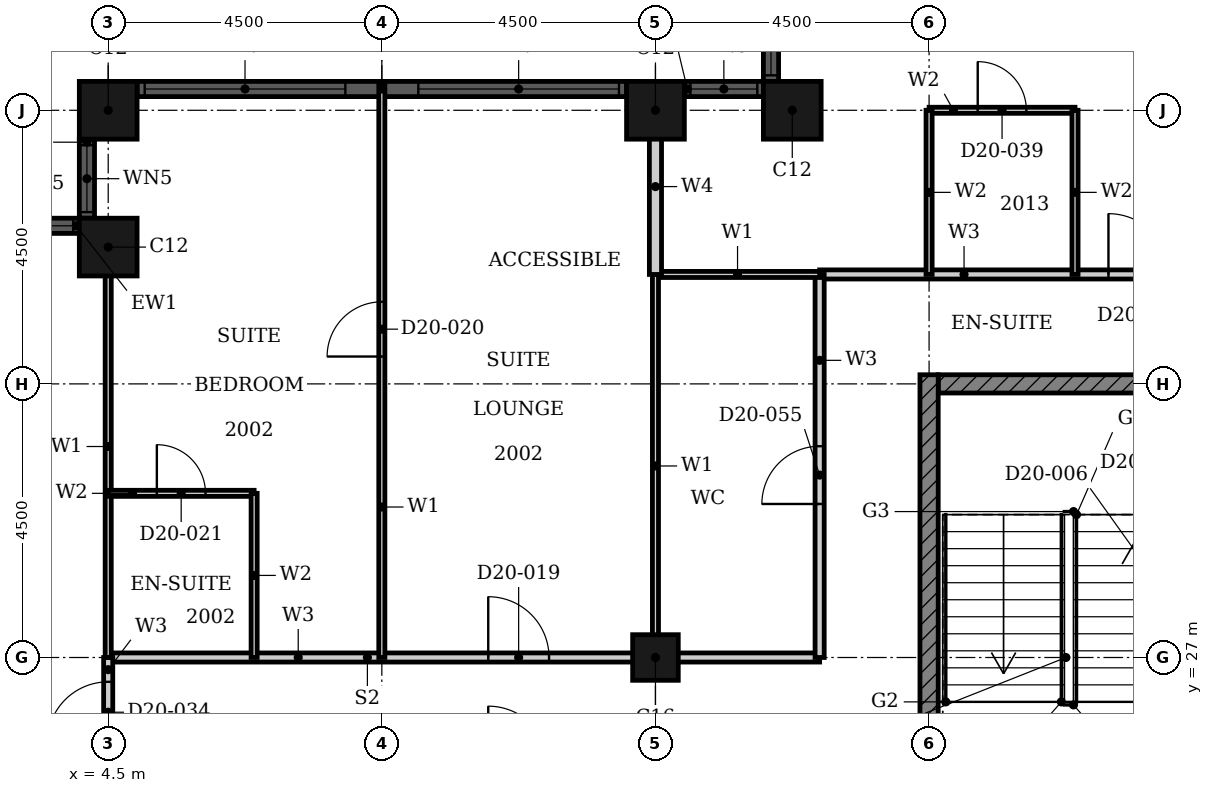
"""IFC4 building model, lengths in metres.
Left out: names, types, materials, properties, quantities, classifications, styles, units other than length and angle.
Written with IfcOpenShell. Run it as: python <this file> out.ifc"""

import sys

from ifc_helpers import new_model, si_unit, direction, frame, frame_2d, origin, origin_2d, place, context, subcontext, project, spatial, rectangle, hollow_rectangle, extrude, element, fill, save


model = new_model("IFC4")
c1 = context("Model", 3, precision=1e-05, world=origin(), true_north=direction((0.0, 1.0)))
c2 = subcontext(c1, "Body", "Model", "MODEL_VIEW")
j1 = project(units=[si_unit("LENGTHUNIT", "METRE"), si_unit("PLANEANGLEUNIT", "RADIAN")], contexts=[c1])
p1 = place(None, origin())
s1 = spatial("IfcSite", under=j1, at=p1, CompositionType="ELEMENT")
p2 = place(p1, origin())
s2 = spatial("IfcBuilding", under=s1, at=p2, CompositionType="ELEMENT")
p3 = place(p2, frame((0.0, 0.0, 85.2)))
s3 = spatial("IfcBuildingStorey", under=s2, at=p3, CompositionType="ELEMENT", Elevation=85.2)
for number, where, z_axis, x_axis in (
    (1, (15.75, 36.0, 0.0), (0.0, 0.0, 1.0), (1.0, 0.0, 0.0)),
    (2, (13.5, 36.0, 0.0), (0.0, 0.0, 1.0), (1.0, 0.0, 0.0)),
    (3, (4.5, 36.0, 0.0), (0.0, 0.0, 1.0), (1.0, 0.0, 0.0)),
    (4, (4.5, 33.75, 0.0), (0.0, 0.0, 1.0), (1.0, 0.0, 0.0)),
):
    element("IfcColumn", number, at=place(p3, frame(where, z_axis=z_axis, x_axis=x_axis)), inside=s3, PredefinedType="COLUMN", context=c2, shape_type="SweptSolid", body=[
        extrude(hollow_rectangle(XDim=0.95, YDim=0.95, WallThickness=0.03, at=origin_2d()), origin(), (0.0, 0.0, 1.0), 3.6),
    ])
p4 = place(p3, frame((13.5, 27.0, 0.0), z_axis=(0.0, 0.0, 1.0), x_axis=(1.0, 0.0, 0.0)))
e5 = element("IfcColumn", 5, at=p4, inside=s3, PredefinedType="COLUMN", context=c2, shape_type="SweptSolid", body=[
    extrude(hollow_rectangle(XDim=0.75, YDim=0.75, WallThickness=0.024, at=origin_2d()), origin(), (0.0, 0.0, 1.0), 3.6),
])
p5 = place(p3, frame((15.4, 37.775, 0.0), z_axis=(0.0, 0.0, 1.0), x_axis=(0.0, -1.0, 0.0)))
e6 = element("IfcWall", 6, at=p5, inside=s3, PredefinedType="SOLIDWALL", context=c2, shape_type="SweptSolid", body=[
    extrude(rectangle(XDim=1.3, YDim=0.25, at=frame_2d((0.65, 0.0))), origin(), (0.0, 0.0, 1.0), 3.6),
])
p6 = place(p5, frame((0.1, 0.0, 0.9)))
e7 = element("IfcOpeningElement", 7, at=p6, cuts=e6, PredefinedType="OPENING", context=c2, shape_type="SweptSolid", body=[
    extrude(rectangle(XDim=1.1, YDim=2.08, at=frame_2d((0.55, 1.04))), frame((0.0, 0.135, 0.0), z_axis=(0.0, -1.0, 0.0), x_axis=(1.0, 0.0, 0.0)), (0.0, 0.0, 1.0), 0.27),
])
p7 = place(p3, frame((15.275, 36.35, 0.0), z_axis=(0.0, 0.0, 1.0), x_axis=(-1.0, 0.0, 0.0)))
e8 = element("IfcWall", 8, at=p7, inside=s3, PredefinedType="SOLIDWALL", context=c2, shape_type="SweptSolid", body=[
    extrude(rectangle(XDim=1.3, YDim=0.25, at=frame_2d((0.65, 0.0))), origin(), (0.0, 0.0, 1.0), 3.6),
])
p8 = place(p7, frame((0.1, 0.0, 0.9)))
e9 = element("IfcOpeningElement", 9, at=p8, cuts=e8, PredefinedType="OPENING", context=c2, shape_type="SweptSolid", body=[
    extrude(rectangle(XDim=1.1, YDim=2.08, at=frame_2d((0.55, 1.04))), frame((0.0, 0.135, 0.0), z_axis=(0.0, -1.0, 0.0), x_axis=(1.0, 0.0, 0.0)), (0.0, 0.0, 1.0), 0.27),
])
p9 = place(p3, frame((13.025, 36.35, 0.0), z_axis=(0.0, 0.0, 1.0), x_axis=(-1.0, 0.0, 0.0)))
e10 = element("IfcWall", 10, at=p9, inside=s3, PredefinedType="SOLIDWALL", context=c2, shape_type="SweptSolid", body=[
    extrude(rectangle(XDim=8.05, YDim=0.25, at=frame_2d((4.025, 0.0))), origin(), (0.0, 0.0, 1.0), 3.6),
])
p10 = place(p9, frame((0.125, 0.0, 0.9)))
e11 = element("IfcOpeningElement", 11, at=p10, cuts=e10, PredefinedType="OPENING", context=c2, shape_type="SweptSolid", body=[
    extrude(rectangle(XDim=3.3, YDim=2.08, at=frame_2d((1.65, 1.04))), frame((0.0, 0.135, 0.0), z_axis=(0.0, -1.0, 0.0), x_axis=(1.0, 0.0, 0.0)), (0.0, 0.0, 1.0), 0.27),
])
p11 = place(p9, frame((4.625, 0.0, 0.9)))
e12 = element("IfcOpeningElement", 12, at=p11, cuts=e10, PredefinedType="OPENING", context=c2, shape_type="SweptSolid", body=[
    extrude(rectangle(XDim=3.3, YDim=2.08, at=frame_2d((1.65, 1.04))), frame((0.0, 0.135, 0.0), z_axis=(0.0, -1.0, 0.0), x_axis=(1.0, 0.0, 0.0)), (0.0, 0.0, 1.0), 0.27),
])
p12 = place(p3, frame((4.15, 35.525, 0.0), z_axis=(0.0, 0.0, 1.0), x_axis=(0.0, -1.0, 0.0)))
e13 = element("IfcWall", 13, at=p12, inside=s3, PredefinedType="SOLIDWALL", context=c2, shape_type="SweptSolid", body=[
    extrude(rectangle(XDim=1.3, YDim=0.25, at=frame_2d((0.65, 0.0))), origin(), (0.0, 0.0, 1.0), 3.6),
])
p13 = place(p12, frame((0.1, 0.0, 0.9)))
e14 = element("IfcOpeningElement", 14, at=p13, cuts=e13, PredefinedType="OPENING", context=c2, shape_type="SweptSolid", body=[
    extrude(rectangle(XDim=1.1, YDim=2.08, at=frame_2d((0.55, 1.04))), frame((0.0, 0.135, 0.0), z_axis=(0.0, -1.0, 0.0), x_axis=(1.0, 0.0, 0.0)), (0.0, 0.0, 1.0), 0.27),
])
p14 = place(p3, frame((4.025, 34.1, 0.0), z_axis=(0.0, 0.0, 1.0), x_axis=(-1.0, 0.0, 0.0)))
e15 = element("IfcWall", 15, at=p14, inside=s3, PredefinedType="SOLIDWALL", context=c2, shape_type="SweptSolid", body=[
    extrude(rectangle(XDim=1.3, YDim=0.25, at=frame_2d((0.65, 0.0))), origin(), (0.0, 0.0, 1.0), 3.6),
])
p15 = place(p14, frame((0.1, 0.0, 0.9)))
e16 = element("IfcOpeningElement", 16, at=p15, cuts=e15, PredefinedType="OPENING", context=c2, shape_type="SweptSolid", body=[
    extrude(rectangle(XDim=1.1, YDim=2.08, at=frame_2d((0.55, 1.04))), frame((0.0, 0.135, 0.0), z_axis=(0.0, -1.0, 0.0), x_axis=(1.0, 0.0, 0.0)), (0.0, 0.0, 1.0), 0.27),
])
p16 = place(p3, frame((18.15, 31.5, 0.0), z_axis=(0.0, 0.0, 1.0), x_axis=(1.0, 0.0, 0.0)))
e17 = element("IfcWall", 17, at=p16, inside=s3, PredefinedType="SHEAR", context=c2, shape_type="SweptSolid", body=[
    extrude(rectangle(XDim=6.797, YDim=0.3, at=frame_2d((3.398, 0.0))), origin(), (0.0, 0.0, 1.0), 3.3),
])
p17 = place(p16, frame((4.736, 0.0, 0.0)))
e18 = element("IfcOpeningElement", 18, at=p17, cuts=e17, PredefinedType="OPENING", context=c2, shape_type="SweptSolid", body=[
    extrude(rectangle(XDim=1.8, YDim=2.1, at=frame_2d((0.9, 1.05))), frame((0.0, 0.16, 0.0), z_axis=(0.0, -1.0, 0.0), x_axis=(1.0, 0.0, 0.0)), (0.0, 0.0, 1.0), 0.32),
])
p18 = place(p3, frame((18.0, 22.35, 0.0), z_axis=(0.0, 0.0, 1.0), x_axis=(0.0, 1.0, 0.0)))
e19 = element("IfcWall", 19, at=p18, inside=s3, PredefinedType="SHEAR", context=c2, shape_type="SweptSolid", body=[
    extrude(rectangle(XDim=9.3, YDim=0.3, at=frame_2d((4.65, 0.0))), origin(), (0.0, 0.0, 1.0), 3.3),
])
p19 = place(p3, frame((4.5, 27.0, 0.0), z_axis=(0.0, 0.0, 1.0), x_axis=(1.0, 0.0, 0.0)))
e20 = element("IfcWall", 20, at=p19, inside=s3, PredefinedType="PARTITIONING", context=c2, shape_type="SweptSolid", body=[
    extrude(rectangle(XDim=11.7, YDim=0.15, at=frame_2d((5.85, 0.0))), origin(), (0.0, 0.0, 1.0), 2.58),
])
p20 = place(p19, frame((6.25, 0.0, 0.0)))
e21 = element("IfcOpeningElement", 21, at=p20, cuts=e20, PredefinedType="OPENING", context=c2, shape_type="SweptSolid", body=[
    extrude(rectangle(XDim=1.0, YDim=2.1, at=frame_2d((0.5, 1.05))), frame((0.0, 0.085, 0.0), z_axis=(0.0, -1.0, 0.0), x_axis=(1.0, 0.0, 0.0)), (0.0, 0.0, 1.0), 0.17),
])
p21 = place(p3, frame((16.2, 33.3, 0.0), z_axis=(0.0, 0.0, 1.0), x_axis=(1.0, 0.0, 0.0)))
e22 = element("IfcWall", 22, at=p21, inside=s3, PredefinedType="PARTITIONING", context=c2, shape_type="SweptSolid", body=[
    extrude(rectangle(XDim=15.3, YDim=0.15, at=frame_2d((7.65, 0.0))), origin(), (0.0, 0.0, 1.0), 3.3),
])
p22 = place(p21, frame((4.75, 0.0, 0.0)))
e23 = element("IfcOpeningElement", 23, at=p22, cuts=e22, PredefinedType="OPENING", context=c2, shape_type="SweptSolid", body=[
    extrude(rectangle(XDim=1.0, YDim=2.1, at=frame_2d((0.5, 1.05))), frame((0.0, 0.085, 0.0), z_axis=(0.0, -1.0, 0.0), x_axis=(1.0, 0.0, 0.0)), (0.0, 0.0, 1.0), 0.17),
])
p23 = place(p21, frame((10.35, 0.0, 0.0)))
e24 = element("IfcOpeningElement", 24, at=p23, cuts=e22, PredefinedType="OPENING", context=c2, shape_type="SweptSolid", body=[
    extrude(rectangle(XDim=0.9, YDim=2.1, at=frame_2d((0.45, 1.05))), frame((0.0, 0.085, 0.0), z_axis=(0.0, -1.0, 0.0), x_axis=(1.0, 0.0, 0.0)), (0.0, 0.0, 1.0), 0.17),
])
p24 = place(p3, frame((16.2, 27.0, 0.0), z_axis=(0.0, 0.0, 1.0), x_axis=(0.0, 1.0, 0.0)))
e25 = element("IfcWall", 25, at=p24, inside=s3, PredefinedType="PARTITIONING", context=c2, shape_type="SweptSolid", body=[
    extrude(rectangle(XDim=6.3, YDim=0.15, at=frame_2d((3.15, 0.0))), origin(), (0.0, 0.0, 1.0), 3.3),
])
p25 = place(p24, frame((2.525, 0.0, 0.0)))
e26 = element("IfcOpeningElement", 26, at=p25, cuts=e25, PredefinedType="OPENING", context=c2, shape_type="SweptSolid", body=[
    extrude(rectangle(XDim=0.95, YDim=2.1, at=frame_2d((0.475, 1.05))), frame((0.0, 0.085, 0.0), z_axis=(0.0, -1.0, 0.0), x_axis=(1.0, 0.0, 0.0)), (0.0, 0.0, 1.0), 0.17),
])
p26 = place(p3, frame((4.5, 25.2, 0.0), z_axis=(0.0, 0.0, 1.0), x_axis=(0.0, 1.0, 0.0)))
e27 = element("IfcWall", 27, at=p26, inside=s3, PredefinedType="PARTITIONING", context=c2, shape_type="SweptSolid", body=[
    extrude(rectangle(XDim=1.8, YDim=0.15, at=frame_2d((0.9, 0.0))), origin(), (0.0, 0.0, 1.0), 3.3),
])
p27 = place(p26, frame((0.4, 0.0, 0.0)))
e28 = element("IfcOpeningElement", 28, at=p27, cuts=e27, PredefinedType="OPENING", context=c2, shape_type="SweptSolid", body=[
    extrude(rectangle(XDim=1.0, YDim=2.1, at=frame_2d((0.5, 1.05))), frame((0.0, 0.085, 0.0), z_axis=(0.0, -1.0, 0.0), x_axis=(1.0, 0.0, 0.0)), (0.0, 0.0, 1.0), 0.17),
])
p28 = place(p3, frame((13.5, 33.3, 0.0), z_axis=(0.0, 0.0, 1.0), x_axis=(1.0, 0.0, 0.0)))
e29 = element("IfcWall", 29, at=p28, inside=s3, PredefinedType="PARTITIONING", context=c2, shape_type="SweptSolid", body=[
    extrude(rectangle(XDim=2.7, YDim=0.1, at=frame_2d((1.35, 0.0))), origin(), (0.0, 0.0, 1.0), 3.3),
])
p29 = place(p3, frame((13.5, 27.0, 0.0), z_axis=(0.0, 0.0, 1.0), x_axis=(0.0, 1.0, 0.0)))
e30 = element("IfcWall", 30, at=p29, inside=s3, PredefinedType="PARTITIONING", context=c2, shape_type="SweptSolid", body=[
    extrude(rectangle(XDim=6.3, YDim=0.1, at=frame_2d((3.15, 0.0))), origin(), (0.0, 0.0, 1.0), 2.38),
])
p30 = place(p3, frame((4.5, 27.0, 0.0), z_axis=(0.0, 0.0, 1.0), x_axis=(0.0, 1.0, 0.0)))
e31 = element("IfcWall", 31, at=p30, inside=s3, PredefinedType="PARTITIONING", context=c2, shape_type="SweptSolid", body=[
    extrude(rectangle(XDim=6.94, YDim=0.1, at=frame_2d((3.47, 0.0))), origin(), (0.0, 0.0, 1.0), 3.3),
])
p31 = place(p3, frame((9.0, 27.0, 0.0), z_axis=(0.0, 0.0, 1.0), x_axis=(0.0, 1.0, 0.0)))
e32 = element("IfcWall", 32, at=p31, inside=s3, PredefinedType="PARTITIONING", context=c2, shape_type="SweptSolid", body=[
    extrude(rectangle(XDim=9.415, YDim=0.1, at=frame_2d((4.708, 0.0))), origin(), (0.0, 0.0, 1.0), 3.3),
])
p32 = place(p31, frame((4.95, 0.0, 0.0)))
e33 = element("IfcOpeningElement", 33, at=p32, cuts=e32, PredefinedType="OPENING", context=c2, shape_type="SweptSolid", body=[
    extrude(rectangle(XDim=0.9, YDim=2.1, at=frame_2d((0.45, 1.05))), frame((0.0, 0.06, 0.0), z_axis=(0.0, -1.0, 0.0), x_axis=(1.0, 0.0, 0.0)), (0.0, 0.0, 1.0), 0.12),
])
p33 = place(p3, frame((13.5, 33.3, 0.0), z_axis=(0.0, 0.0, 1.0), x_axis=(0.0, 1.0, 0.0)))
e34 = element("IfcWall", 34, at=p33, inside=s3, PredefinedType="PARTITIONING", context=c2, shape_type="SweptSolid", body=[
    extrude(rectangle(XDim=2.89, YDim=0.2, at=frame_2d((1.445, 0.0))), origin(), (0.0, 0.0, 1.0), 2.38),
])
p34 = place(p3, frame((4.5, 29.7, 0.0), z_axis=(0.0, 0.0, 1.0), x_axis=(1.0, 0.0, 0.0)))
e35 = element("IfcWall", 35, at=p34, inside=s3, PredefinedType="PARTITIONING", context=c2, shape_type="SweptSolid", body=[
    extrude(rectangle(XDim=2.4, YDim=0.1, at=frame_2d((1.2, 0.0))), origin(), (0.0, 0.0, 1.0), 3.3),
])
p35 = place(p34, frame((0.8, 0.0, 0.0)))
e36 = element("IfcOpeningElement", 36, at=p35, cuts=e35, PredefinedType="OPENING", context=c2, shape_type="SweptSolid", body=[
    extrude(rectangle(XDim=0.8, YDim=2.1, at=frame_2d((0.4, 1.05))), frame((0.0, 0.06, 0.0), z_axis=(0.0, -1.0, 0.0), x_axis=(1.0, 0.0, 0.0)), (0.0, 0.0, 1.0), 0.12),
])
p36 = place(p3, frame((18.0, 36.0, 0.0), z_axis=(0.0, 0.0, 1.0), x_axis=(1.0, 0.0, 0.0)))
e37 = element("IfcWall", 37, at=p36, inside=s3, PredefinedType="PARTITIONING", context=c2, shape_type="SweptSolid", body=[
    extrude(rectangle(XDim=2.4, YDim=0.1, at=frame_2d((1.2, 0.0))), origin(), (0.0, 0.0, 1.0), 3.3),
])
p37 = place(p36, frame((0.8, 0.0, 0.0)))
e38 = element("IfcOpeningElement", 38, at=p37, cuts=e37, PredefinedType="OPENING", context=c2, shape_type="SweptSolid", body=[
    extrude(rectangle(XDim=0.8, YDim=2.1, at=frame_2d((0.4, 1.05))), frame((0.0, 0.06, 0.0), z_axis=(0.0, -1.0, 0.0), x_axis=(1.0, 0.0, 0.0)), (0.0, 0.0, 1.0), 0.12),
])
for number, where, z_axis, x_axis in (
    (39, (18.0, 33.3, 0.0), (0.0, 0.0, 1.0), (0.0, 1.0, 0.0)),
    (40, (20.4, 33.3, 0.0), (0.0, 0.0, 1.0), (0.0, 1.0, 0.0)),
    (41, (6.9, 27.0, 0.0), (0.0, 0.0, 1.0), (0.0, 1.0, 0.0)),
):
    element("IfcWall", number, at=place(p3, frame(where, z_axis=z_axis, x_axis=x_axis)), inside=s3, PredefinedType="PARTITIONING", context=c2, shape_type="SweptSolid", body=[
        extrude(rectangle(XDim=2.7, YDim=0.1, at=frame_2d((1.35, 0.0))), origin(), (0.0, 0.0, 1.0), 3.3),
    ])
p38 = place(p6, origin())
e42 = element("IfcWindow", 42, at=p38, inside=s3, PartitioningType="SINGLE_PANEL", PredefinedType="WINDOW", context=c2, shape_type="SweptSolid", body=[
    extrude(rectangle(XDim=1.1, YDim=2.08, at=frame_2d((0.55, 1.04))), frame((0.0, 0.03, 0.0), z_axis=(0.0, -1.0, 0.0), x_axis=(1.0, 0.0, 0.0)), (0.0, 0.0, 1.0), 0.06),
])
fill(e7, e42)
p39 = place(p8, origin())
e43 = element("IfcWindow", 43, at=p39, inside=s3, PartitioningType="SINGLE_PANEL", PredefinedType="WINDOW", context=c2, shape_type="SweptSolid", body=[
    extrude(rectangle(XDim=1.1, YDim=2.08, at=frame_2d((0.55, 1.04))), frame((0.0, 0.03, 0.0), z_axis=(0.0, -1.0, 0.0), x_axis=(1.0, 0.0, 0.0)), (0.0, 0.0, 1.0), 0.06),
])
fill(e9, e43)
p40 = place(p10, origin())
e44 = element("IfcWindow", 44, at=p40, inside=s3, PartitioningType="SINGLE_PANEL", PredefinedType="WINDOW", context=c2, shape_type="SweptSolid", body=[
    extrude(rectangle(XDim=3.3, YDim=2.08, at=frame_2d((1.65, 1.04))), frame((0.0, 0.03, 0.0), z_axis=(0.0, -1.0, 0.0), x_axis=(1.0, 0.0, 0.0)), (0.0, 0.0, 1.0), 0.06),
])
fill(e11, e44)
p41 = place(p11, origin())
e45 = element("IfcWindow", 45, at=p41, inside=s3, PartitioningType="SINGLE_PANEL", PredefinedType="WINDOW", context=c2, shape_type="SweptSolid", body=[
    extrude(rectangle(XDim=3.3, YDim=2.08, at=frame_2d((1.65, 1.04))), frame((0.0, 0.03, 0.0), z_axis=(0.0, -1.0, 0.0), x_axis=(1.0, 0.0, 0.0)), (0.0, 0.0, 1.0), 0.06),
])
fill(e12, e45)
p42 = place(p13, origin())
e46 = element("IfcWindow", 46, at=p42, inside=s3, PartitioningType="SINGLE_PANEL", PredefinedType="WINDOW", context=c2, shape_type="SweptSolid", body=[
    extrude(rectangle(XDim=1.1, YDim=2.08, at=frame_2d((0.55, 1.04))), frame((0.0, 0.03, 0.0), z_axis=(0.0, -1.0, 0.0), x_axis=(1.0, 0.0, 0.0)), (0.0, 0.0, 1.0), 0.06),
])
fill(e14, e46)
p43 = place(p15, origin())
e47 = element("IfcWindow", 47, at=p43, inside=s3, PartitioningType="SINGLE_PANEL", PredefinedType="WINDOW", context=c2, shape_type="SweptSolid", body=[
    extrude(rectangle(XDim=1.1, YDim=2.08, at=frame_2d((0.55, 1.04))), frame((0.0, 0.03, 0.0), z_axis=(0.0, -1.0, 0.0), x_axis=(1.0, 0.0, 0.0)), (0.0, 0.0, 1.0), 0.06),
])
fill(e16, e47)
p44 = place(p20, origin())
e48 = element("IfcDoor", 48, at=p44, inside=s3, OperationType="SINGLE_SWING_LEFT", PredefinedType="DOOR", context=c2, shape_type="SweptSolid", body=[
    extrude(rectangle(XDim=1.0, YDim=2.1, at=frame_2d((0.5, 1.05))), frame((0.0, 0.025, 0.0), z_axis=(0.0, -1.0, 0.0), x_axis=(1.0, 0.0, 0.0)), (0.0, 0.0, 1.0), 0.05),
])
fill(e21, e48)
p45 = place(p32, origin())
e49 = element("IfcDoor", 49, at=p45, inside=s3, OperationType="SINGLE_SWING_RIGHT", PredefinedType="DOOR", context=c2, shape_type="SweptSolid", body=[
    extrude(rectangle(XDim=0.9, YDim=2.1, at=frame_2d((0.45, 1.05))), frame((0.0, 0.025, 0.0), z_axis=(0.0, -1.0, 0.0), x_axis=(1.0, 0.0, 0.0)), (0.0, 0.0, 1.0), 0.05),
])
fill(e33, e49)
p46 = place(p35, origin())
e50 = element("IfcDoor", 50, at=p46, inside=s3, OperationType="SINGLE_SWING_RIGHT", PredefinedType="DOOR", context=c2, shape_type="SweptSolid", body=[
    extrude(rectangle(XDim=0.8, YDim=2.1, at=frame_2d((0.4, 1.05))), frame((0.0, 0.025, 0.0), z_axis=(0.0, -1.0, 0.0), x_axis=(1.0, 0.0, 0.0)), (0.0, 0.0, 1.0), 0.05),
])
fill(e36, e50)
p47 = place(p27, origin())
e51 = element("IfcDoor", 51, at=p47, inside=s3, OperationType="SINGLE_SWING_RIGHT", PredefinedType="DOOR", context=c2, shape_type="SweptSolid", body=[
    extrude(rectangle(XDim=1.0, YDim=2.1, at=frame_2d((0.5, 1.05))), frame((0.0, 0.025, 0.0), z_axis=(0.0, -1.0, 0.0), x_axis=(1.0, 0.0, 0.0)), (0.0, 0.0, 1.0), 0.05),
])
fill(e28, e51)
p48 = place(p22, origin())
e52 = element("IfcDoor", 52, at=p48, inside=s3, OperationType="SINGLE_SWING_RIGHT", PredefinedType="DOOR", context=c2, shape_type="SweptSolid", body=[
    extrude(rectangle(XDim=1.0, YDim=2.1, at=frame_2d((0.5, 1.05))), frame((0.0, 0.025, 0.0), z_axis=(0.0, -1.0, 0.0), x_axis=(1.0, 0.0, 0.0)), (0.0, 0.0, 1.0), 0.05),
])
fill(e23, e52)
p49 = place(p37, origin())
e53 = element("IfcDoor", 53, at=p49, inside=s3, OperationType="SINGLE_SWING_LEFT", PredefinedType="DOOR", context=c2, shape_type="SweptSolid", body=[
    extrude(rectangle(XDim=0.8, YDim=2.1, at=frame_2d((0.4, 1.05))), frame((0.0, 0.025, 0.0), z_axis=(0.0, -1.0, 0.0), x_axis=(1.0, 0.0, 0.0)), (0.0, 0.0, 1.0), 0.05),
])
fill(e38, e53)
p50 = place(p25, origin())
e54 = element("IfcDoor", 54, at=p50, inside=s3, OperationType="SINGLE_SWING_LEFT", PredefinedType="DOOR", context=c2, shape_type="SweptSolid", body=[
    extrude(rectangle(XDim=0.95, YDim=2.1, at=frame_2d((0.475, 1.05))), frame((0.0, 0.025, 0.0), z_axis=(0.0, -1.0, 0.0), x_axis=(1.0, 0.0, 0.0)), (0.0, 0.0, 1.0), 0.05),
])
fill(e26, e54)
save(model, sys.argv[1])
